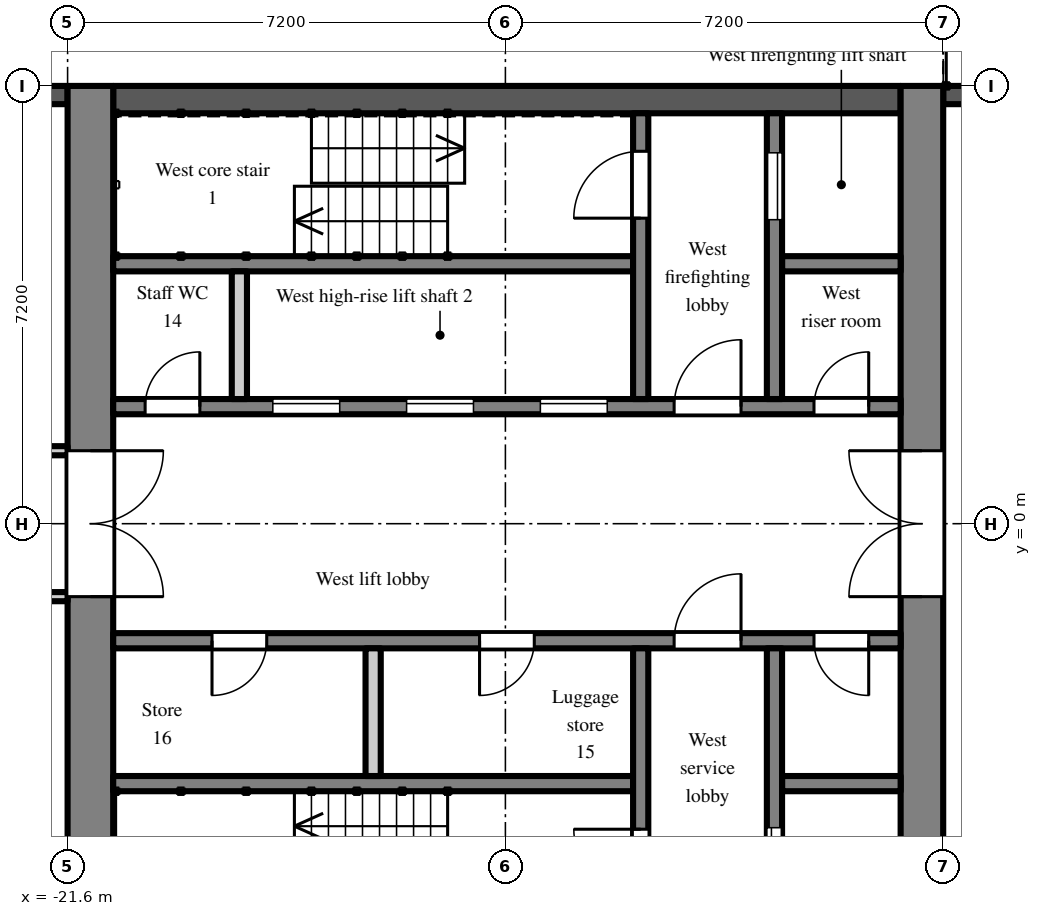
"""IFC4 building model, lengths in metres.
Left out: names, types, materials, properties, quantities, classifications, styles, units other than length and angle.
Written with IfcOpenShell. Run it as: python <this file> out.ifc"""

import sys

from ifc_helpers import new_model, si_unit, direction, frame, frame_2d, origin, place, context, subcontext, project, spatial, rectangle, extrude, element, fill, save


model = new_model("IFC4")
c1 = context("Model", 3, precision=1e-05, world=origin(), true_north=direction((0.0, 1.0)))
c2 = subcontext(c1, "Body", "Model", "MODEL_VIEW")
j1 = project(units=[si_unit("LENGTHUNIT", "METRE"), si_unit("PLANEANGLEUNIT", "RADIAN")], contexts=[c1])
p1 = place(None, origin())
s1 = spatial("IfcSite", under=j1, at=p1, CompositionType="ELEMENT")
p2 = place(p1, origin())
s2 = spatial("IfcBuilding", under=s1, at=p2, CompositionType="ELEMENT")
p3 = place(p2, frame((0.0, 0.0, 138.3)))
s3 = spatial("IfcBuildingStorey", under=s2, at=p3, CompositionType="ELEMENT", Elevation=138.3)
p4 = place(p3, frame((-4.2, 7.05, 0.0), z_axis=(0.0, 0.0, 1.0), x_axis=(-1.0, 0.0, 0.0)))
e1 = element("IfcWall", 1, at=p4, inside=s3, PredefinedType="SOLIDWALL", context=c2, shape_type="SweptSolid", body=[
    extrude(rectangle(XDim=3.0, YDim=0.3, at=frame_2d((1.5, 0.0))), origin(), (0.0, 0.0, 1.0), 2.2),
])
p5 = place(p3, frame((-21.6, 7.05, 0.0), z_axis=(0.0, 0.0, 1.0), x_axis=(-1.0, 0.0, 0.0)))
e2 = element("IfcWall", 2, at=p5, inside=s3, PredefinedType="SOLIDWALL", context=c2, shape_type="SweptSolid", body=[
    extrude(rectangle(XDim=2.7, YDim=0.3, at=frame_2d((1.35, 0.0))), origin(), (0.0, 0.0, 1.0), 2.2),
])
p6 = place(p5, frame((0.75, 0.0, 0.2)))
e3 = element("IfcOpeningElement", 3, at=p6, cuts=e2, PredefinedType="OPENING", context=c2, shape_type="SweptSolid", body=[
    extrude(rectangle(XDim=1.2, YDim=1.85, at=frame_2d((0.6, 0.925))), frame((0.0, 0.16, 0.0), z_axis=(0.0, -1.0, 0.0), x_axis=(1.0, 0.0, 0.0)), (0.0, 0.0, 1.0), 0.32),
])
p7 = place(p3, frame((-7.55, -7.2, 0.0), z_axis=(0.0, 0.0, 1.0), x_axis=(0.0, 1.0, 0.0)))
e4 = element("IfcWall", 4, at=p7, inside=s3, PredefinedType="SHEAR", context=c2, shape_type="SweptSolid", body=[
    extrude(rectangle(XDim=14.4, YDim=0.7, at=frame_2d((7.2, 0.0))), origin(), (0.0, 0.0, 1.0), 2.6),
])
p8 = place(p7, frame((6.0, 0.0, 0.0)))
e5 = element("IfcOpeningElement", 5, at=p8, cuts=e4, PredefinedType="OPENING", context=c2, shape_type="SweptSolid", body=[
    extrude(rectangle(XDim=2.4, YDim=2.2, at=frame_2d((1.2, 1.1))), frame((0.0, 0.36, 0.0), z_axis=(0.0, -1.0, 0.0), x_axis=(1.0, 0.0, 0.0)), (0.0, 0.0, 1.0), 0.72),
])
p9 = place(p3, frame((-21.225, -7.2, 0.0), z_axis=(0.0, 0.0, 1.0), x_axis=(0.0, 1.0, 0.0)))
e6 = element("IfcWall", 6, at=p9, inside=s3, PredefinedType="SHEAR", context=c2, shape_type="SweptSolid", body=[
    extrude(rectangle(XDim=14.4, YDim=0.75, at=frame_2d((7.2, 0.0))), origin(), (0.0, 0.0, 1.0), 2.6),
])
p10 = place(p9, frame((6.0, 0.0, 0.0)))
e7 = element("IfcOpeningElement", 7, at=p10, cuts=e6, PredefinedType="OPENING", context=c2, shape_type="SweptSolid", body=[
    extrude(rectangle(XDim=2.4, YDim=2.2, at=frame_2d((1.2, 1.1))), frame((0.0, 0.385, 0.0), z_axis=(0.0, -1.0, 0.0), x_axis=(1.0, 0.0, 0.0)), (0.0, 0.0, 1.0), 0.77),
])
p11 = place(p3, frame((-7.9, 6.975, 0.0), z_axis=(0.0, 0.0, 1.0), x_axis=(-1.0, 0.0, 0.0)))
e8 = element("IfcWall", 8, at=p11, inside=s3, PredefinedType="SHEAR", context=c2, shape_type="SweptSolid", body=[
    extrude(rectangle(XDim=12.95, YDim=0.45, at=frame_2d((6.475, 0.0))), origin(), (0.0, 0.0, 1.0), 2.6),
])
p12 = place(p3, frame((-7.9, 1.925, 0.0), z_axis=(0.0, 0.0, 1.0), x_axis=(-1.0, 0.0, 0.0)))
e9 = element("IfcWall", 9, at=p12, inside=s3, PredefinedType="SHEAR", context=c2, shape_type="SweptSolid", body=[
    extrude(rectangle(XDim=12.95, YDim=0.25, at=frame_2d((6.475, 0.0))), origin(), (0.0, 0.0, 1.0), 2.6),
])
p13 = place(p12, frame((4.825, 0.0, 0.0)))
e10 = element("IfcOpeningElement", 10, at=p13, cuts=e9, PredefinedType="OPENING", context=c2, shape_type="SweptSolid", body=[
    extrude(rectangle(XDim=1.1, YDim=2.1, at=frame_2d((0.55, 1.05))), frame((0.0, 0.135, 0.0), z_axis=(0.0, -1.0, 0.0), x_axis=(1.0, 0.0, 0.0)), (0.0, 0.0, 1.0), 0.27),
])
p14 = place(p12, frame((7.025, 0.0, 0.0)))
e11 = element("IfcOpeningElement", 11, at=p14, cuts=e9, PredefinedType="OPENING", context=c2, shape_type="SweptSolid", body=[
    extrude(rectangle(XDim=1.1, YDim=2.1, at=frame_2d((0.55, 1.05))), frame((0.0, 0.135, 0.0), z_axis=(0.0, -1.0, 0.0), x_axis=(1.0, 0.0, 0.0)), (0.0, 0.0, 1.0), 0.27),
])
p15 = place(p12, frame((9.225, 0.0, 0.0)))
e12 = element("IfcOpeningElement", 12, at=p15, cuts=e9, PredefinedType="OPENING", context=c2, shape_type="SweptSolid", body=[
    extrude(rectangle(XDim=1.1, YDim=2.1, at=frame_2d((0.55, 1.05))), frame((0.0, 0.135, 0.0), z_axis=(0.0, -1.0, 0.0), x_axis=(1.0, 0.0, 0.0)), (0.0, 0.0, 1.0), 0.27),
])
p16 = place(p12, frame((0.525, 0.0, 0.0)))
e13 = element("IfcOpeningElement", 13, at=p16, cuts=e9, PredefinedType="OPENING", context=c2, shape_type="SweptSolid", body=[
    extrude(rectangle(XDim=0.9, YDim=2.1, at=frame_2d((0.45, 1.05))), frame((0.0, 0.135, 0.0), z_axis=(0.0, -1.0, 0.0), x_axis=(1.0, 0.0, 0.0)), (0.0, 0.0, 1.0), 0.27),
])
p17 = place(p12, frame((2.625, 0.0, 0.0)))
e14 = element("IfcOpeningElement", 14, at=p17, cuts=e9, PredefinedType="OPENING", context=c2, shape_type="SweptSolid", body=[
    extrude(rectangle(XDim=1.1, YDim=2.1, at=frame_2d((0.55, 1.05))), frame((0.0, 0.135, 0.0), z_axis=(0.0, -1.0, 0.0), x_axis=(1.0, 0.0, 0.0)), (0.0, 0.0, 1.0), 0.27),
])
p18 = place(p12, frame((11.525, 0.0, 0.0)))
e15 = element("IfcOpeningElement", 15, at=p18, cuts=e9, PredefinedType="OPENING", context=c2, shape_type="SweptSolid", body=[
    extrude(rectangle(XDim=0.9, YDim=2.1, at=frame_2d((0.45, 1.05))), frame((0.0, 0.135, 0.0), z_axis=(0.0, -1.0, 0.0), x_axis=(1.0, 0.0, 0.0)), (0.0, 0.0, 1.0), 0.27),
])
p19 = place(p3, frame((-7.9, 4.275, 0.0), z_axis=(0.0, 0.0, 1.0), x_axis=(-1.0, 0.0, 0.0)))
e16 = element("IfcWall", 16, at=p19, inside=s3, PredefinedType="SHEAR", context=c2, shape_type="SweptSolid", body=[
    extrude(rectangle(XDim=1.95, YDim=0.25, at=frame_2d((0.975, 0.0))), origin(), (0.0, 0.0, 1.0), 2.6),
])
p20 = place(p3, frame((-12.3, 4.275, 0.0), z_axis=(0.0, 0.0, 1.0), x_axis=(-1.0, 0.0, 0.0)))
e17 = element("IfcWall", 17, at=p20, inside=s3, PredefinedType="SHEAR", context=c2, shape_type="SweptSolid", body=[
    extrude(rectangle(XDim=8.55, YDim=0.25, at=frame_2d((4.275, 0.0))), origin(), (0.0, 0.0, 1.0), 2.6),
])
p21 = place(p3, frame((-9.975, 2.05, 0.0), z_axis=(0.0, 0.0, 1.0), x_axis=(0.0, 1.0, 0.0)))
e18 = element("IfcWall", 18, at=p21, inside=s3, PredefinedType="SHEAR", context=c2, shape_type="SweptSolid", body=[
    extrude(rectangle(XDim=4.7, YDim=0.25, at=frame_2d((2.35, 0.0))), origin(), (0.0, 0.0, 1.0), 2.6),
])
p22 = place(p21, frame((2.95, 0.0, 0.0)))
e19 = element("IfcOpeningElement", 19, at=p22, cuts=e18, PredefinedType="OPENING", context=c2, shape_type="SweptSolid", body=[
    extrude(rectangle(XDim=1.1, YDim=2.1, at=frame_2d((0.55, 1.05))), frame((0.0, 0.135, 0.0), z_axis=(0.0, -1.0, 0.0), x_axis=(1.0, 0.0, 0.0)), (0.0, 0.0, 1.0), 0.27),
])
p23 = place(p3, frame((-12.175, 2.05, 0.0), z_axis=(0.0, 0.0, 1.0), x_axis=(0.0, 1.0, 0.0)))
e20 = element("IfcWall", 20, at=p23, inside=s3, PredefinedType="SHEAR", context=c2, shape_type="SweptSolid", body=[
    extrude(rectangle(XDim=4.7, YDim=0.25, at=frame_2d((2.35, 0.0))), origin(), (0.0, 0.0, 1.0), 2.6),
])
p24 = place(p23, frame((2.975, 0.0, 0.0)))
e21 = element("IfcOpeningElement", 21, at=p24, cuts=e20, PredefinedType="OPENING", context=c2, shape_type="SweptSolid", body=[
    extrude(rectangle(XDim=1.1, YDim=2.1, at=frame_2d((0.55, 1.05))), frame((0.0, 0.135, 0.0), z_axis=(0.0, -1.0, 0.0), x_axis=(1.0, 0.0, 0.0)), (0.0, 0.0, 1.0), 0.27),
])
p25 = place(p3, frame((-18.775, 2.05, 0.0), z_axis=(0.0, 0.0, 1.0), x_axis=(0.0, 1.0, 0.0)))
e22 = element("IfcWall", 22, at=p25, inside=s3, PredefinedType="PARTITIONING", context=c2, shape_type="SweptSolid", body=[
    extrude(rectangle(XDim=2.1, YDim=0.25, at=frame_2d((1.05, 0.0))), origin(), (0.0, 0.0, 1.0), 2.6),
])
p26 = place(p3, frame((-7.9, -1.925, 0.0), z_axis=(0.0, 0.0, 1.0), x_axis=(-1.0, 0.0, 0.0)))
e23 = element("IfcWall", 23, at=p26, inside=s3, PredefinedType="SHEAR", context=c2, shape_type="SweptSolid", body=[
    extrude(rectangle(XDim=12.95, YDim=0.25, at=frame_2d((6.475, 0.0))), origin(), (0.0, 0.0, 1.0), 2.6),
])
p27 = place(p26, frame((0.525, 0.0, 0.0)))
e24 = element("IfcOpeningElement", 24, at=p27, cuts=e23, PredefinedType="OPENING", context=c2, shape_type="SweptSolid", body=[
    extrude(rectangle(XDim=0.9, YDim=2.1, at=frame_2d((0.45, 1.05))), frame((0.0, 0.135, 0.0), z_axis=(0.0, -1.0, 0.0), x_axis=(1.0, 0.0, 0.0)), (0.0, 0.0, 1.0), 0.27),
])
p28 = place(p26, frame((2.625, 0.0, 0.0)))
e25 = element("IfcOpeningElement", 25, at=p28, cuts=e23, PredefinedType="OPENING", context=c2, shape_type="SweptSolid", body=[
    extrude(rectangle(XDim=1.1, YDim=2.1, at=frame_2d((0.55, 1.05))), frame((0.0, 0.135, 0.0), z_axis=(0.0, -1.0, 0.0), x_axis=(1.0, 0.0, 0.0)), (0.0, 0.0, 1.0), 0.27),
])
p29 = place(p26, frame((6.025, 0.0, 0.0)))
e26 = element("IfcOpeningElement", 26, at=p29, cuts=e23, PredefinedType="OPENING", context=c2, shape_type="SweptSolid", body=[
    extrude(rectangle(XDim=0.9, YDim=2.1, at=frame_2d((0.45, 1.05))), frame((0.0, 0.135, 0.0), z_axis=(0.0, -1.0, 0.0), x_axis=(1.0, 0.0, 0.0)), (0.0, 0.0, 1.0), 0.27),
])
p30 = place(p26, frame((10.425, 0.0, 0.0)))
e27 = element("IfcOpeningElement", 27, at=p30, cuts=e23, PredefinedType="OPENING", context=c2, shape_type="SweptSolid", body=[
    extrude(rectangle(XDim=0.9, YDim=2.1, at=frame_2d((0.45, 1.05))), frame((0.0, 0.135, 0.0), z_axis=(0.0, -1.0, 0.0), x_axis=(1.0, 0.0, 0.0)), (0.0, 0.0, 1.0), 0.27),
])
p31 = place(p3, frame((-7.9, -4.275, 0.0), z_axis=(0.0, 0.0, 1.0), x_axis=(-1.0, 0.0, 0.0)))
e28 = element("IfcWall", 28, at=p31, inside=s3, PredefinedType="SHEAR", context=c2, shape_type="SweptSolid", body=[
    extrude(rectangle(XDim=1.95, YDim=0.25, at=frame_2d((0.975, 0.0))), origin(), (0.0, 0.0, 1.0), 2.6),
])
p32 = place(p3, frame((-12.3, -4.275, 0.0), z_axis=(0.0, 0.0, 1.0), x_axis=(-1.0, 0.0, 0.0)))
e29 = element("IfcWall", 29, at=p32, inside=s3, PredefinedType="SHEAR", context=c2, shape_type="SweptSolid", body=[
    extrude(rectangle(XDim=8.55, YDim=0.25, at=frame_2d((4.275, 0.0))), origin(), (0.0, 0.0, 1.0), 2.6),
])
p33 = place(p3, frame((-9.975, -2.05, 0.0), z_axis=(0.0, 0.0, 1.0), x_axis=(0.0, -1.0, 0.0)))
e30 = element("IfcWall", 30, at=p33, inside=s3, PredefinedType="SHEAR", context=c2, shape_type="SweptSolid", body=[
    extrude(rectangle(XDim=4.7, YDim=0.25, at=frame_2d((2.35, 0.0))), origin(), (0.0, 0.0, 1.0), 2.6),
])
p34 = place(p33, frame((2.95, 0.0, 0.0)))
e31 = element("IfcOpeningElement", 31, at=p34, cuts=e30, PredefinedType="OPENING", context=c2, shape_type="SweptSolid", body=[
    extrude(rectangle(XDim=1.1, YDim=2.1, at=frame_2d((0.55, 1.05))), frame((0.0, 0.135, 0.0), z_axis=(0.0, -1.0, 0.0), x_axis=(1.0, 0.0, 0.0)), (0.0, 0.0, 1.0), 0.27),
])
p35 = place(p3, frame((-12.175, -2.05, 0.0), z_axis=(0.0, 0.0, 1.0), x_axis=(0.0, -1.0, 0.0)))
e32 = element("IfcWall", 32, at=p35, inside=s3, PredefinedType="SHEAR", context=c2, shape_type="SweptSolid", body=[
    extrude(rectangle(XDim=4.7, YDim=0.25, at=frame_2d((2.35, 0.0))), origin(), (0.0, 0.0, 1.0), 2.6),
])
p36 = place(p35, frame((2.975, 0.0, 0.0)))
e33 = element("IfcOpeningElement", 33, at=p36, cuts=e32, PredefinedType="OPENING", context=c2, shape_type="SweptSolid", body=[
    extrude(rectangle(XDim=1.1, YDim=2.1, at=frame_2d((0.55, 1.05))), frame((0.0, 0.135, 0.0), z_axis=(0.0, -1.0, 0.0), x_axis=(1.0, 0.0, 0.0)), (0.0, 0.0, 1.0), 0.27),
])
p37 = place(p3, frame((-16.575, -2.05, 0.0), z_axis=(0.0, 0.0, 1.0), x_axis=(0.0, -1.0, 0.0)))
e34 = element("IfcWall", 34, at=p37, inside=s3, PredefinedType="PARTITIONING", context=c2, shape_type="SweptSolid", body=[
    extrude(rectangle(XDim=2.1, YDim=0.25, at=frame_2d((1.05, 0.0))), origin(), (0.0, 0.0, 1.0), 2.6),
])
p38 = place(p3, frame((-36.5, -1.2, 0.0), z_axis=(0.0, 0.0, 1.0), x_axis=(1.0, 0.0, 0.0)))
e35 = element("IfcWall", 35, at=p38, inside=s3, PredefinedType="PARTITIONING", context=c2, shape_type="SweptSolid", body=[
    extrude(rectangle(XDim=14.9, YDim=0.15, at=frame_2d((7.45, 0.0))), origin(), (0.0, 0.0, 1.0), 2.6),
])
p39 = place(p38, frame((7.9, 0.0, 0.0)))
e36 = element("IfcOpeningElement", 36, at=p39, cuts=e35, PredefinedType="OPENING", context=c2, shape_type="SweptSolid", body=[
    extrude(rectangle(XDim=1.0, YDim=2.1, at=frame_2d((0.5, 1.05))), frame((0.0, 0.085, 0.0), z_axis=(0.0, -1.0, 0.0), x_axis=(1.0, 0.0, 0.0)), (0.0, 0.0, 1.0), 0.17),
])
p40 = place(p38, frame((6.35, 0.0, 0.0)))
e37 = element("IfcOpeningElement", 37, at=p40, cuts=e35, PredefinedType="OPENING", context=c2, shape_type="SweptSolid", body=[
    extrude(rectangle(XDim=0.9, YDim=2.1, at=frame_2d((0.45, 1.05))), frame((0.0, 0.085, 0.0), z_axis=(0.0, -1.0, 0.0), x_axis=(1.0, 0.0, 0.0)), (0.0, 0.0, 1.0), 0.17),
])
p41 = place(p38, frame((4.55, 0.0, 0.0)))
e38 = element("IfcOpeningElement", 38, at=p41, cuts=e35, PredefinedType="OPENING", context=c2, shape_type="SweptSolid", body=[
    extrude(rectangle(XDim=0.9, YDim=2.1, at=frame_2d((0.45, 1.05))), frame((0.0, 0.085, 0.0), z_axis=(0.0, -1.0, 0.0), x_axis=(1.0, 0.0, 0.0)), (0.0, 0.0, 1.0), 0.17),
])
p42 = place(p38, frame((1.15, 0.0, 0.0)))
e39 = element("IfcOpeningElement", 39, at=p42, cuts=e35, PredefinedType="OPENING", context=c2, shape_type="SweptSolid", body=[
    extrude(rectangle(XDim=1.8, YDim=2.1, at=frame_2d((0.9, 1.05))), frame((0.0, 0.085, 0.0), z_axis=(0.0, -1.0, 0.0), x_axis=(1.0, 0.0, 0.0)), (0.0, 0.0, 1.0), 0.17),
])
p43 = place(p3, frame((-36.5, 1.2, 0.0), z_axis=(0.0, 0.0, 1.0), x_axis=(1.0, 0.0, 0.0)))
e40 = element("IfcWall", 40, at=p43, inside=s3, PredefinedType="PARTITIONING", context=c2, shape_type="SweptSolid", body=[
    extrude(rectangle(XDim=14.9, YDim=0.15, at=frame_2d((7.45, 0.0))), origin(), (0.0, 0.0, 1.0), 2.6),
])
p44 = place(p43, frame((10.4, 0.0, 0.0)))
e41 = element("IfcOpeningElement", 41, at=p44, cuts=e40, PredefinedType="OPENING", context=c2, shape_type="SweptSolid", body=[
    extrude(rectangle(XDim=1.8, YDim=2.1, at=frame_2d((0.9, 1.05))), frame((0.0, 0.085, 0.0), z_axis=(0.0, -1.0, 0.0), x_axis=(1.0, 0.0, 0.0)), (0.0, 0.0, 1.0), 0.17),
])
p45 = place(p43, frame((5.45, 0.0, 0.0)))
e42 = element("IfcOpeningElement", 42, at=p45, cuts=e40, PredefinedType="OPENING", context=c2, shape_type="SweptSolid", body=[
    extrude(rectangle(XDim=0.9, YDim=2.1, at=frame_2d((0.45, 1.05))), frame((0.0, 0.085, 0.0), z_axis=(0.0, -1.0, 0.0), x_axis=(1.0, 0.0, 0.0)), (0.0, 0.0, 1.0), 0.17),
])
p46 = place(p43, frame((1.15, 0.0, 0.0)))
e43 = element("IfcOpeningElement", 43, at=p46, cuts=e40, PredefinedType="OPENING", context=c2, shape_type="SweptSolid", body=[
    extrude(rectangle(XDim=1.8, YDim=2.1, at=frame_2d((0.9, 1.05))), frame((0.0, 0.085, 0.0), z_axis=(0.0, -1.0, 0.0), x_axis=(1.0, 0.0, 0.0)), (0.0, 0.0, 1.0), 0.17),
])
p47 = place(p13, origin())
e44 = element("IfcDoor", 44, at=p47, inside=s3, OperationType="SLIDING_TO_LEFT", PredefinedType="DOOR", context=c2, shape_type="SweptSolid", body=[
    extrude(rectangle(XDim=1.1, YDim=2.1, at=frame_2d((0.55, 1.05))), frame((0.0, 0.025, 0.0), z_axis=(0.0, -1.0, 0.0), x_axis=(1.0, 0.0, 0.0)), (0.0, 0.0, 1.0), 0.05),
])
fill(e10, e44)
p48 = place(p14, origin())
e45 = element("IfcDoor", 45, at=p48, inside=s3, OperationType="SLIDING_TO_LEFT", PredefinedType="DOOR", context=c2, shape_type="SweptSolid", body=[
    extrude(rectangle(XDim=1.1, YDim=2.1, at=frame_2d((0.55, 1.05))), frame((0.0, 0.025, 0.0), z_axis=(0.0, -1.0, 0.0), x_axis=(1.0, 0.0, 0.0)), (0.0, 0.0, 1.0), 0.05),
])
fill(e11, e45)
p49 = place(p15, origin())
e46 = element("IfcDoor", 46, at=p49, inside=s3, OperationType="SLIDING_TO_LEFT", PredefinedType="DOOR", context=c2, shape_type="SweptSolid", body=[
    extrude(rectangle(XDim=1.1, YDim=2.1, at=frame_2d((0.55, 1.05))), frame((0.0, 0.025, 0.0), z_axis=(0.0, -1.0, 0.0), x_axis=(1.0, 0.0, 0.0)), (0.0, 0.0, 1.0), 0.05),
])
fill(e12, e46)
p50 = place(p22, origin())
e47 = element("IfcDoor", 47, at=p50, inside=s3, OperationType="SLIDING_TO_LEFT", PredefinedType="DOOR", context=c2, shape_type="SweptSolid", body=[
    extrude(rectangle(XDim=1.1, YDim=2.1, at=frame_2d((0.55, 1.05))), frame((0.0, 0.025, 0.0), z_axis=(0.0, -1.0, 0.0), x_axis=(1.0, 0.0, 0.0)), (0.0, 0.0, 1.0), 0.05),
])
fill(e19, e47)
p51 = place(p34, origin())
e48 = element("IfcDoor", 48, at=p51, inside=s3, OperationType="SLIDING_TO_LEFT", PredefinedType="DOOR", context=c2, shape_type="SweptSolid", body=[
    extrude(rectangle(XDim=1.1, YDim=2.1, at=frame_2d((0.55, 1.05))), frame((0.0, 0.025, 0.0), z_axis=(0.0, -1.0, 0.0), x_axis=(1.0, 0.0, 0.0)), (0.0, 0.0, 1.0), 0.05),
])
fill(e31, e48)
p52 = place(p24, origin())
e49 = element("IfcDoor", 49, at=p52, inside=s3, OperationType="SINGLE_SWING_LEFT", PredefinedType="DOOR", context=c2, shape_type="SweptSolid", body=[
    extrude(rectangle(XDim=1.1, YDim=2.1, at=frame_2d((0.55, 1.05))), frame((0.0, 0.025, 0.0), z_axis=(0.0, -1.0, 0.0), x_axis=(1.0, 0.0, 0.0)), (0.0, 0.0, 1.0), 0.05),
])
fill(e21, e49)
p53 = place(p36, frame((1.1, 0.0, 0.0), z_axis=(0.0, 0.0, 1.0), x_axis=(-1.0, 0.0, 0.0)))
e50 = element("IfcDoor", 50, at=p53, inside=s3, OperationType="SINGLE_SWING_RIGHT", PredefinedType="DOOR", context=c2, shape_type="SweptSolid", body=[
    extrude(rectangle(XDim=1.1, YDim=2.1, at=frame_2d((0.55, 1.05))), frame((0.0, 0.025, 0.0), z_axis=(0.0, -1.0, 0.0), x_axis=(1.0, 0.0, 0.0)), (0.0, 0.0, 1.0), 0.05),
])
fill(e33, e50)
p54 = place(p16, frame((0.9, 0.0, 0.0), z_axis=(0.0, 0.0, 1.0), x_axis=(-1.0, 0.0, 0.0)))
e51 = element("IfcDoor", 51, at=p54, inside=s3, OperationType="SINGLE_SWING_RIGHT", PredefinedType="DOOR", context=c2, shape_type="SweptSolid", body=[
    extrude(rectangle(XDim=0.9, YDim=2.1, at=frame_2d((0.45, 1.05))), frame((0.0, 0.025, 0.0), z_axis=(0.0, -1.0, 0.0), x_axis=(1.0, 0.0, 0.0)), (0.0, 0.0, 1.0), 0.05),
])
fill(e13, e51)
p55 = place(p27, origin())
e52 = element("IfcDoor", 52, at=p55, inside=s3, OperationType="SINGLE_SWING_LEFT", PredefinedType="DOOR", context=c2, shape_type="SweptSolid", body=[
    extrude(rectangle(XDim=0.9, YDim=2.1, at=frame_2d((0.45, 1.05))), frame((0.0, 0.025, 0.0), z_axis=(0.0, -1.0, 0.0), x_axis=(1.0, 0.0, 0.0)), (0.0, 0.0, 1.0), 0.05),
])
fill(e24, e52)
p56 = place(p17, frame((1.1, 0.0, 0.0), z_axis=(0.0, 0.0, 1.0), x_axis=(-1.0, 0.0, 0.0)))
e53 = element("IfcDoor", 53, at=p56, inside=s3, OperationType="SINGLE_SWING_RIGHT", PredefinedType="DOOR", context=c2, shape_type="SweptSolid", body=[
    extrude(rectangle(XDim=1.1, YDim=2.1, at=frame_2d((0.55, 1.05))), frame((0.0, 0.025, 0.0), z_axis=(0.0, -1.0, 0.0), x_axis=(1.0, 0.0, 0.0)), (0.0, 0.0, 1.0), 0.05),
])
fill(e14, e53)
p57 = place(p28, frame((1.1, 0.0, 0.0), z_axis=(0.0, 0.0, 1.0), x_axis=(-1.0, 0.0, 0.0)))
e54 = element("IfcDoor", 54, at=p57, inside=s3, OperationType="SINGLE_SWING_RIGHT", PredefinedType="DOOR", context=c2, shape_type="SweptSolid", body=[
    extrude(rectangle(XDim=1.1, YDim=2.1, at=frame_2d((0.55, 1.05))), frame((0.0, 0.025, 0.0), z_axis=(0.0, -1.0, 0.0), x_axis=(1.0, 0.0, 0.0)), (0.0, 0.0, 1.0), 0.05),
])
fill(e25, e54)
p58 = place(p8, origin())
e55 = element("IfcDoor", 55, at=p58, inside=s3, OperationType="DOUBLE_DOOR_DOUBLE_SWING", PredefinedType="DOOR", context=c2, shape_type="SweptSolid", body=[
    extrude(rectangle(XDim=2.4, YDim=2.2, at=frame_2d((1.2, 1.1))), frame((0.0, 0.025, 0.0), z_axis=(0.0, -1.0, 0.0), x_axis=(1.0, 0.0, 0.0)), (0.0, 0.0, 1.0), 0.05),
])
fill(e5, e55)
p59 = place(p10, frame((2.4, 0.0, 0.0), z_axis=(0.0, 0.0, 1.0), x_axis=(-1.0, 0.0, 0.0)))
e56 = element("IfcDoor", 56, at=p59, inside=s3, OperationType="DOUBLE_DOOR_DOUBLE_SWING", PredefinedType="DOOR", context=c2, shape_type="SweptSolid", body=[
    extrude(rectangle(XDim=2.4, YDim=2.2, at=frame_2d((1.2, 1.1))), frame((0.0, 0.025, 0.0), z_axis=(0.0, -1.0, 0.0), x_axis=(1.0, 0.0, 0.0)), (0.0, 0.0, 1.0), 0.05),
])
fill(e7, e56)
p60 = place(p18, frame((0.9, 0.0, 0.0), z_axis=(0.0, 0.0, 1.0), x_axis=(-1.0, 0.0, 0.0)))
e57 = element("IfcDoor", 57, at=p60, inside=s3, OperationType="SINGLE_SWING_RIGHT", PredefinedType="DOOR", context=c2, shape_type="SweptSolid", body=[
    extrude(rectangle(XDim=0.9, YDim=2.1, at=frame_2d((0.45, 1.05))), frame((0.0, 0.025, 0.0), z_axis=(0.0, -1.0, 0.0), x_axis=(1.0, 0.0, 0.0)), (0.0, 0.0, 1.0), 0.05),
])
fill(e15, e57)
p61 = place(p29, origin())
e58 = element("IfcDoor", 58, at=p61, inside=s3, OperationType="SINGLE_SWING_RIGHT", PredefinedType="DOOR", context=c2, shape_type="SweptSolid", body=[
    extrude(rectangle(XDim=0.9, YDim=2.1, at=frame_2d((0.45, 1.05))), frame((0.0, 0.025, 0.0), z_axis=(0.0, -1.0, 0.0), x_axis=(1.0, 0.0, 0.0)), (0.0, 0.0, 1.0), 0.05),
])
fill(e26, e58)
p62 = place(p30, origin())
e59 = element("IfcDoor", 59, at=p62, inside=s3, OperationType="SINGLE_SWING_RIGHT", PredefinedType="DOOR", context=c2, shape_type="SweptSolid", body=[
    extrude(rectangle(XDim=0.9, YDim=2.1, at=frame_2d((0.45, 1.05))), frame((0.0, 0.025, 0.0), z_axis=(0.0, -1.0, 0.0), x_axis=(1.0, 0.0, 0.0)), (0.0, 0.0, 1.0), 0.05),
])
fill(e27, e59)
save(model, sys.argv[1])
